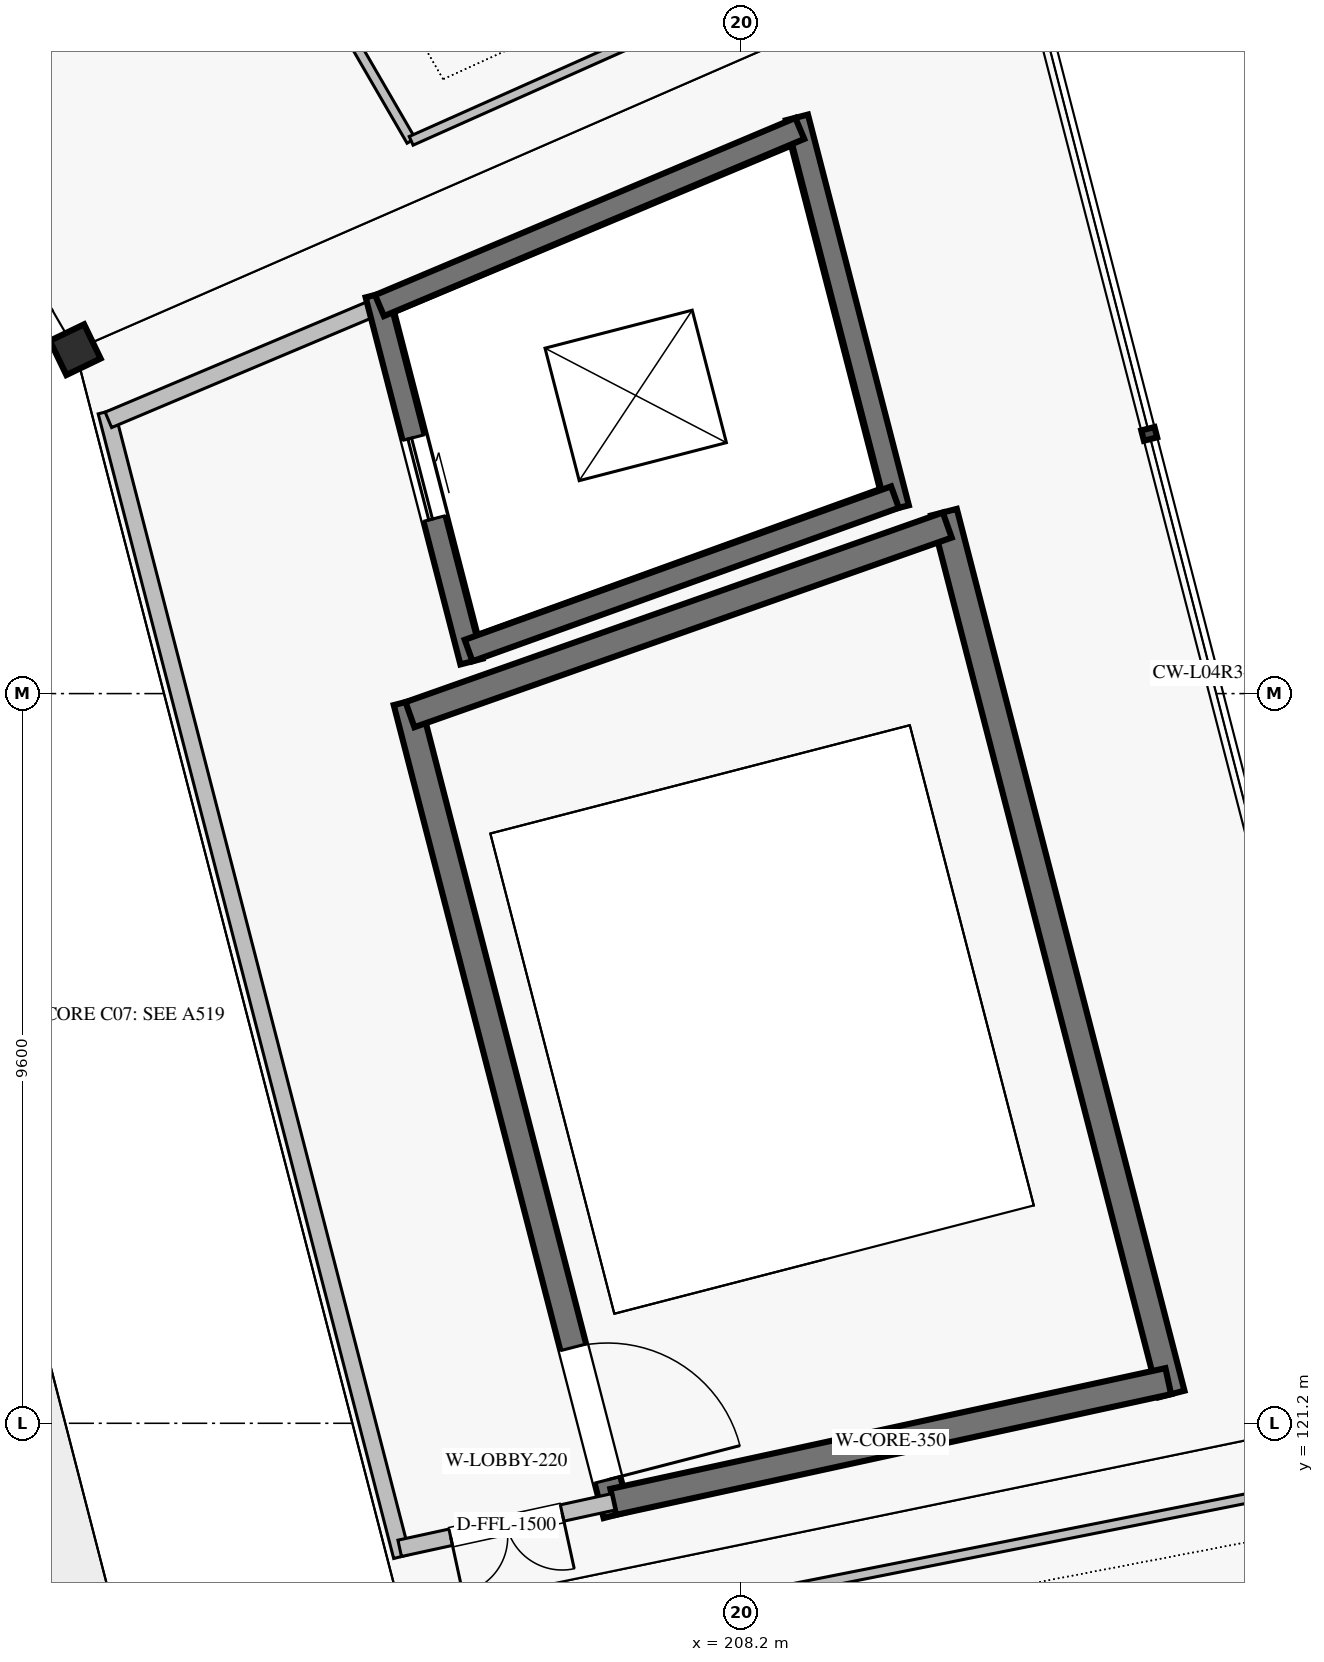
"""IFC4 building model, lengths in metres.
Left out: names, types, materials, properties, quantities, classifications, styles, units other than length and angle.
Written with IfcOpenShell. Run it as: python <this file> out.ifc"""

import sys

from ifc_helpers import new_model, si_unit, direction, frame, frame_2d, origin, origin_2d, place, context, subcontext, project, spatial, rectangle, hollow_rectangle, extrude, element, fill, save


model = new_model("IFC4")
c1 = context("Model", 3, precision=1e-05, world=origin(), true_north=direction((0.0, 1.0)))
c2 = subcontext(c1, "Body", "Model", "MODEL_VIEW")
j1 = project(units=[si_unit("LENGTHUNIT", "METRE"), si_unit("PLANEANGLEUNIT", "RADIAN")], contexts=[c1])
p1 = place(None, origin())
s1 = spatial("IfcSite", under=j1, at=p1, CompositionType="ELEMENT")
p2 = place(p1, origin())
s2 = spatial("IfcBuilding", under=s1, at=p2, CompositionType="ELEMENT")
p3 = place(p2, frame((0.0, 0.0, 20.4)))
s3 = spatial("IfcBuildingStorey", under=s2, at=p3, CompositionType="ELEMENT", Elevation=20.4)
p4 = place(p3, frame((199.441, 135.325, 0.0), z_axis=(0.0, 0.0, 1.0), x_axis=(0.900968867905, 0.433883739113, 0.0)))
e1 = element("IfcColumn", 1, at=p4, inside=s3, PredefinedType="COLUMN", context=c2, shape_type="SweptSolid", body=[
    extrude(hollow_rectangle(XDim=0.5, YDim=0.5, WallThickness=0.022, at=origin_2d()), origin(), (0.0, 0.0, 1.0), 5.44),
])
p5 = place(p3, frame((206.562, 119.996, 0.0), z_axis=(0.0, 0.0, 1.0), x_axis=(-0.249959564539, 0.968256276042, 0.0)))
e2 = element("IfcWall", 2, at=p5, inside=s3, PredefinedType="SHEAR", context=c2, shape_type="SweptSolid", body=[
    extrude(rectangle(XDim=11.047, YDim=0.35, at=frame_2d((5.523, 0.0))), origin(), (0.0, 0.0, 1.0), 5.18),
])
p6 = place(p5, frame((0.475, 0.0, 0.0)))
e3 = element("IfcOpeningElement", 3, at=p6, cuts=e2, PredefinedType="OPENING", context=c2, shape_type="SweptSolid", body=[
    extrude(rectangle(XDim=1.8, YDim=2.2, at=frame_2d((0.9, 1.1))), frame((0.0, 0.185, 0.0), z_axis=(0.0, -1.0, 0.0), x_axis=(1.0, 0.0, 0.0)), (0.0, 0.0, 1.0), 0.37),
])
p7 = place(p3, frame((213.866, 121.585, 0.0), z_axis=(0.0, 0.0, 1.0), x_axis=(-0.249969221583, 0.968253782983, 0.0)))
e4 = element("IfcWall", 4, at=p7, inside=s3, PredefinedType="SHEAR", context=c2, shape_type="SweptSolid", body=[
    extrude(rectangle(XDim=11.982, YDim=0.35, at=frame_2d((5.991, 0.0))), origin(), (0.0, 0.0, 1.0), 5.18),
])
p8 = place(p3, frame((206.519, 120.166, 0.0), z_axis=(0.0, 0.0, 1.0), x_axis=(0.977149528138, 0.2125530514, 0.0)))
e5 = element("IfcWall", 5, at=p8, inside=s3, PredefinedType="SHEAR", context=c2, shape_type="SweptSolid", body=[
    extrude(rectangle(XDim=7.474, YDim=0.35, at=frame_2d((3.737, 0.0))), origin(), (0.0, 0.0, 1.0), 5.18),
])
p9 = place(p3, frame((203.845, 130.523, 0.0), z_axis=(0.0, 0.0, 1.0), x_axis=(0.943032412173, 0.332700871042, 0.0)))
e6 = element("IfcWall", 6, at=p9, inside=s3, PredefinedType="SHEAR", context=c2, shape_type="SweptSolid", body=[
    extrude(rectangle(XDim=7.497, YDim=0.35, at=frame_2d((3.748, 0.0))), origin(), (0.0, 0.0, 1.0), 5.18),
])
p10 = place(p3, frame((204.654, 131.221, 0.0), z_axis=(0.0, 0.0, 1.0), x_axis=(-0.250003862389, 0.968244839279, 0.0)))
e7 = element("IfcWall", 7, at=p10, inside=s3, PredefinedType="SHEAR", context=c2, shape_type="SweptSolid", body=[
    extrude(rectangle(XDim=4.987, YDim=0.3, at=frame_2d((2.494, 0.0))), origin(), (0.0, 0.0, 1.0), 5.18),
])
p11 = place(p10, frame((1.944, 0.0, 0.0)))
e8 = element("IfcOpeningElement", 8, at=p11, cuts=e7, PredefinedType="OPENING", context=c2, shape_type="SweptSolid", body=[
    extrude(rectangle(XDim=1.1, YDim=2.2, at=frame_2d((0.55, 1.1))), frame((0.0, 0.16, 0.0), z_axis=(0.0, -1.0, 0.0), x_axis=(1.0, 0.0, 0.0)), (0.0, 0.0, 1.0), 0.32),
])
p12 = place(p3, frame((210.264, 133.24, 0.0), z_axis=(0.0, 0.0, 1.0), x_axis=(-0.249961459705, 0.968255786795, 0.0)))
e9 = element("IfcWall", 9, at=p12, inside=s3, PredefinedType="SHEAR", context=c2, shape_type="SweptSolid", body=[
    extrude(rectangle(XDim=5.309, YDim=0.3, at=frame_2d((2.655, 0.0))), origin(), (0.0, 0.0, 1.0), 5.18),
])
p13 = place(p3, frame((204.616, 131.366, 0.0), z_axis=(0.0, 0.0, 1.0), x_axis=(0.940945340179, 0.338558513103, 0.0)))
e10 = element("IfcWall", 10, at=p13, inside=s3, PredefinedType="SHEAR", context=c2, shape_type="SweptSolid", body=[
    extrude(rectangle(XDim=5.962, YDim=0.3, at=frame_2d((2.981, 0.0))), origin(), (0.0, 0.0, 1.0), 5.18),
])
p14 = place(p3, frame((203.445, 135.905, 0.0), z_axis=(0.0, 0.0, 1.0), x_axis=(0.92149593043, 0.388388015007, 0.0)))
e11 = element("IfcWall", 11, at=p14, inside=s3, PredefinedType="SHEAR", context=c2, shape_type="SweptSolid", body=[
    extrude(rectangle(XDim=6.001, YDim=0.3, at=frame_2d((3.0, 0.0))), origin(), (0.0, 0.0, 1.0), 5.18),
])
p15 = place(p3, frame((203.737, 119.448, 0.0), z_axis=(0.0, 0.0, 1.0), x_axis=(-0.249963472505, 0.968255267176, 0.0)))
e12 = element("IfcWall", 12, at=p15, inside=s3, PredefinedType="SOLIDWALL", context=c2, shape_type="SweptSolid", body=[
    extrude(rectangle(XDim=15.553, YDim=0.22, at=frame_2d((7.776, 0.0))), origin(), (0.0, 0.0, 1.0), 5.18),
])
p16 = place(p3, frame((203.71, 119.555, 0.0), z_axis=(0.0, 0.0, 1.0), x_axis=(0.977160263607, 0.212503692268, 0.0)))
e13 = element("IfcWall", 13, at=p16, inside=s3, PredefinedType="SOLIDWALL", context=c2, shape_type="SweptSolid", body=[
    extrude(rectangle(XDim=2.875, YDim=0.22, at=frame_2d((1.437, 0.0))), origin(), (0.0, 0.0, 1.0), 5.18),
])
p17 = place(p16, frame((0.687, 0.0, 0.0)))
e14 = element("IfcOpeningElement", 14, at=p17, cuts=e13, PredefinedType="OPENING", context=c2, shape_type="SweptSolid", body=[
    extrude(rectangle(XDim=1.5, YDim=2.2, at=frame_2d((0.75, 1.1))), frame((0.0, 0.12, 0.0), z_axis=(0.0, -1.0, 0.0), x_axis=(1.0, 0.0, 0.0)), (0.0, 0.0, 1.0), 0.24),
])
p18 = place(p3, frame((199.877, 134.401, 0.0), z_axis=(0.0, 0.0, 1.0), x_axis=(0.921486922561, 0.388409386535, 0.0)))
e15 = element("IfcWall", 15, at=p18, inside=s3, PredefinedType="SOLIDWALL", context=c2, shape_type="SweptSolid", body=[
    extrude(rectangle(XDim=3.871, YDim=0.22, at=frame_2d((1.936, 0.0))), origin(), (0.0, 0.0, 1.0), 5.18),
])
p19 = place(p3, frame((208.848, 119.02, 0.0), z_axis=(0.0, 0.0, 1.0), x_axis=(0.980903700741, 0.194494035571, 0.0)))
e16 = element("IfcWall", 16, at=p19, inside=s3, PredefinedType="PARTITIONING", context=c2, shape_type="SweptSolid", body=[
    extrude(rectangle(XDim=7.469, YDim=0.125, at=frame_2d((3.734, 0.0))), origin(), (0.0, 0.0, 1.0), 4.5),
])
p20 = place(p3, frame((203.861, 138.072, 0.0), z_axis=(0.0, 0.0, 1.0), x_axis=(-0.501622425841, 0.865086667273, 0.0)))
e17 = element("IfcWall", 17, at=p20, inside=s3, PredefinedType="PARTITIONING", context=c2, shape_type="SweptSolid", body=[
    extrude(rectangle(XDim=17.417, YDim=0.125, at=frame_2d((8.708, 0.0))), origin(), (0.0, 0.0, 1.0), 4.5),
])
p21 = place(p20, frame((8.198, 0.0, 0.0)))
e18 = element("IfcOpeningElement", 18, at=p21, cuts=e17, PredefinedType="OPENING", context=c2, shape_type="SweptSolid", body=[
    extrude(rectangle(XDim=1.02, YDim=2.1, at=frame_2d((0.51, 1.05))), frame((0.0, 0.073, 0.0), z_axis=(0.0, -1.0, 0.0), x_axis=(1.0, 0.0, 0.0)), (0.0, 0.0, 1.0), 0.145),
])
p22 = place(p3, frame((203.861, 138.072, 0.0), z_axis=(0.0, 0.0, 1.0), x_axis=(0.913244381211, 0.407412199359, 0.0)))
e19 = element("IfcWall", 19, at=p22, inside=s3, PredefinedType="PARTITIONING", context=c2, shape_type="SweptSolid", body=[
    extrude(rectangle(XDim=7.556, YDim=0.125, at=frame_2d((3.778, 0.0))), origin(), (0.0, 0.0, 1.0), 4.5),
])
p23 = place(p6, frame((1.8, 0.0, 0.0), z_axis=(0.0, 0.0, 1.0), x_axis=(-1.0, 0.0, 0.0)))
e20 = element("IfcDoor", 20, at=p23, inside=s3, OperationType="SINGLE_SWING_RIGHT", PredefinedType="DOOR", context=c2, shape_type="SweptSolid", body=[
    extrude(rectangle(XDim=1.8, YDim=2.2, at=frame_2d((0.9, 1.1))), frame((0.0, 0.025, 0.0), z_axis=(0.0, -1.0, 0.0), x_axis=(1.0, 0.0, 0.0)), (0.0, 0.0, 1.0), 0.05),
])
fill(e3, e20)
p24 = place(p11, origin())
e21 = element("IfcDoor", 21, at=p24, inside=s3, OperationType="SLIDING_TO_RIGHT", PredefinedType="DOOR", context=c2, shape_type="SweptSolid", body=[
    extrude(rectangle(XDim=1.1, YDim=2.2, at=frame_2d((0.55, 1.1))), frame((0.0, 0.025, 0.0), z_axis=(0.0, -1.0, 0.0), x_axis=(1.0, 0.0, 0.0)), (0.0, 0.0, 1.0), 0.05),
])
fill(e8, e21)
p25 = place(p17, frame((1.5, 0.0, 0.0), z_axis=(0.0, 0.0, 1.0), x_axis=(-1.0, 0.0, 0.0)))
e22 = element("IfcDoor", 22, at=p25, inside=s3, OperationType="DOUBLE_DOOR_SINGLE_SWING", PredefinedType="DOOR", context=c2, shape_type="SweptSolid", body=[
    extrude(rectangle(XDim=1.5, YDim=2.2, at=frame_2d((0.75, 1.1))), frame((0.0, 0.025, 0.0), z_axis=(0.0, -1.0, 0.0), x_axis=(1.0, 0.0, 0.0)), (0.0, 0.0, 1.0), 0.05),
])
fill(e14, e22)
save(model, sys.argv[1])
